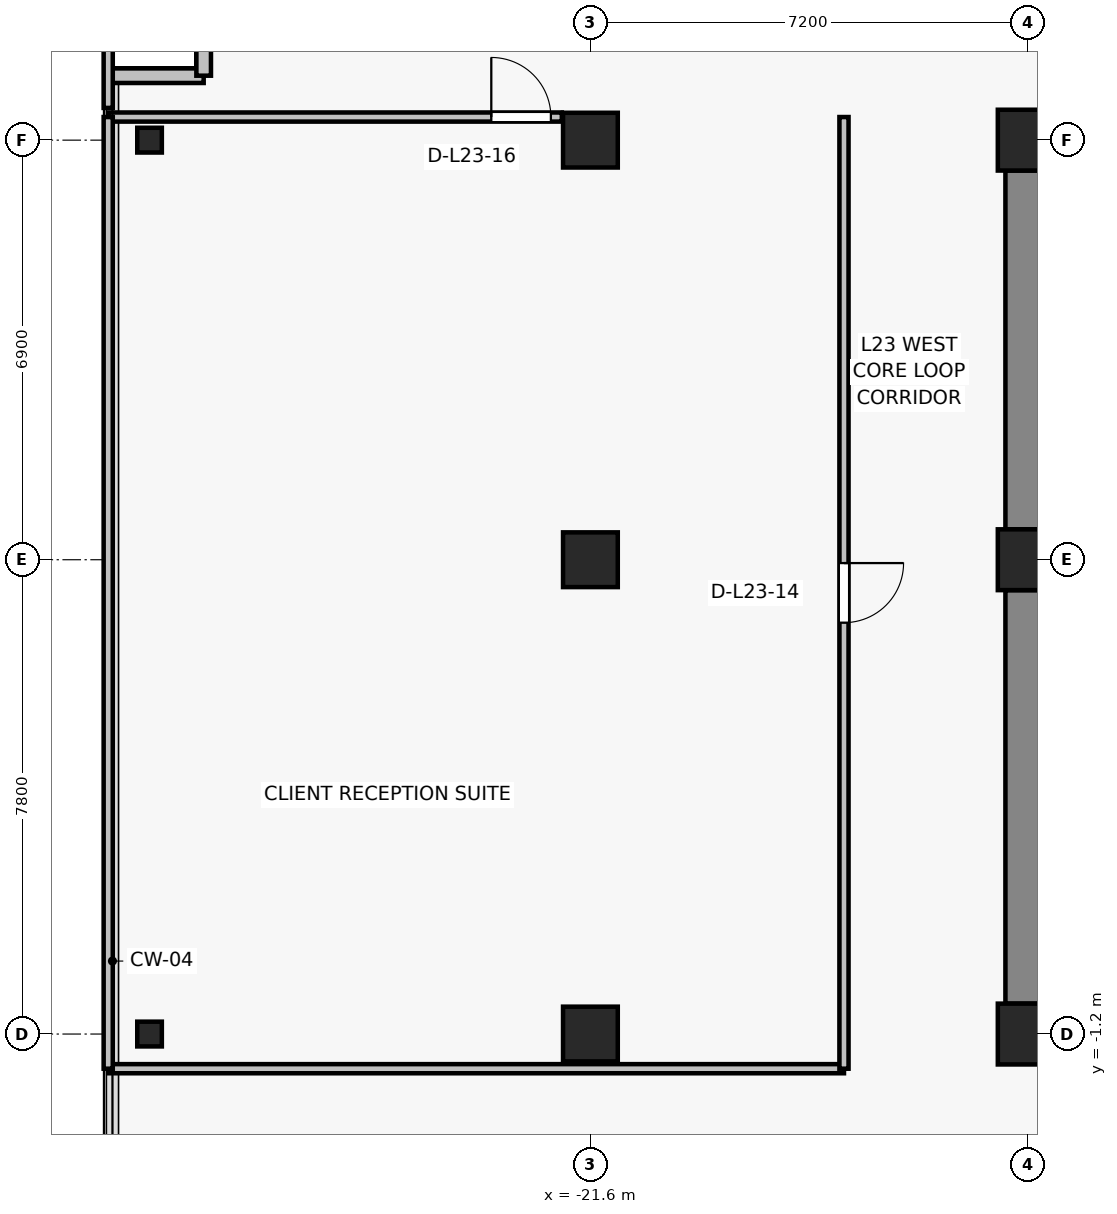
"""IFC4 building model, lengths in metres.
Left out: names, types, materials, properties, quantities, classifications, styles, units other than length and angle.
Written with IfcOpenShell. Run it as: python <this file> out.ifc"""

import sys

from ifc_helpers import new_model, si_unit, direction, frame, frame_2d, origin, origin_2d, place, context, subcontext, project, spatial, rectangle, i_section, extrude, source, transform, mapped, element, fill, save


model = new_model("IFC4")
c1 = context("Model", 3, precision=1e-05, world=origin(), true_north=direction((0.0, 1.0)))
c2 = subcontext(c1, "Body", "Model", "MODEL_VIEW")
j1 = project(units=[si_unit("LENGTHUNIT", "METRE"), si_unit("PLANEANGLEUNIT", "RADIAN")], contexts=[c1])
p1 = place(None, origin())
s1 = spatial("IfcSite", under=j1, at=p1, CompositionType="ELEMENT")
p2 = place(p1, origin())
s2 = spatial("IfcBuilding", under=s1, at=p2, CompositionType="ELEMENT")
p3 = place(p2, frame((0.0, 0.0, 86.8)))
s3 = spatial("IfcBuildingStorey", under=s2, at=p3, CompositionType="ELEMENT", Elevation=86.8)
for number, where, z_axis, x_axis in (
    (1, (-14.4, -1.2, 0.0), (0.0, 0.0, 1.0), (1.0, 0.0, 0.0)),
    (2, (-14.4, 6.6, 0.0), (0.0, 0.0, 1.0), (1.0, 0.0, 0.0)),
    (3, (-14.4, 13.5, 0.0), (0.0, 0.0, 1.0), (1.0, 0.0, 0.0)),
):
    element("IfcColumn", number, at=place(p3, frame(where, z_axis=z_axis, x_axis=x_axis)), inside=s3, PredefinedType="COLUMN", context=c2, shape_type="SweptSolid", body=[
        extrude(rectangle(XDim=1.0, YDim=1.0, at=origin_2d()), origin(), (0.0, 0.0, 1.0), 3.3),
    ])
for number, where, z_axis, x_axis in (
    (4, (-21.6, -1.2, 0.0), (0.0, 0.0, 1.0), (1.0, 0.0, 0.0)),
    (5, (-21.6, 6.6, 0.0), (0.0, 0.0, 1.0), (1.0, 0.0, 0.0)),
    (6, (-21.6, 13.5, 0.0), (0.0, 0.0, 1.0), (1.0, 0.0, 0.0)),
):
    element("IfcColumn", number, at=place(p3, frame(where, z_axis=z_axis, x_axis=x_axis)), inside=s3, PredefinedType="COLUMN", context=c2, shape_type="SweptSolid", body=[
        extrude(rectangle(XDim=0.9, YDim=0.9, at=origin_2d()), origin(), (0.0, 0.0, 1.0), 3.3),
    ])
for number, where, z_axis, x_axis in (
    (7, (-28.85, -1.2, 0.0), (0.0, 0.0, 1.0), (1.0, 0.0, 0.0)),
    (8, (-28.85, 13.5, 0.0), (0.0, 0.0, 1.0), (1.0, 0.0, 0.0)),
):
    element("IfcColumn", number, at=place(p3, frame(where, z_axis=z_axis, x_axis=x_axis)), inside=s3, PredefinedType="COLUMN", context=c2, shape_type="SweptSolid", body=[
        extrude(i_section(OverallWidth=0.404, OverallDepth=0.407, WebThickness=0.022, FlangeThickness=0.032, FilletRadius=0.015, at=origin_2d()), origin(), (0.0, 0.0, 1.0), 3.3),
    ])
p4 = place(p3, frame((-14.4, -0.7, 0.0), z_axis=(0.0, 0.0, 1.0), x_axis=(0.0, 1.0, 0.0)))
e9 = element("IfcWall", 9, at=p4, inside=s3, PredefinedType="SHEAR", context=c2, shape_type="SweptSolid", body=[
    extrude(rectangle(XDim=6.8, YDim=0.75, at=frame_2d((3.4, 0.0))), origin(), (0.0, 0.0, 1.0), 3.075),
])
p5 = place(p3, frame((-14.4, 7.1, 0.0), z_axis=(0.0, 0.0, 1.0), x_axis=(0.0, 1.0, 0.0)))
e10 = element("IfcWall", 10, at=p5, inside=s3, PredefinedType="SHEAR", context=c2, shape_type="SweptSolid", body=[
    extrude(rectangle(XDim=5.9, YDim=0.75, at=frame_2d((2.95, 0.0))), origin(), (0.0, 0.0, 1.0), 3.075),
])
for number, where, z_axis, x_axis in (
    (11, (-27.96, 14.56, 0.0), (0.0, 0.0, 1.0), (-1.0, 0.0, 0.0)),
    (12, (-27.96, 16.06, 0.0), (0.0, 0.0, 1.0), (0.0, -1.0, 0.0)),
):
    element("IfcWall", number, at=place(p3, frame(where, z_axis=z_axis, x_axis=x_axis)), inside=s3, PredefinedType="SOLIDWALL", context=c2, shape_type="SweptSolid", body=[
        extrude(rectangle(XDim=1.5, YDim=0.24, at=frame_2d((0.75, 0.0))), origin(), (0.0, 0.0, 1.0), 3.075),
    ])
p6 = place(p3, frame((-17.43, -1.77, 0.0), z_axis=(0.0, 0.0, 1.0), x_axis=(-1.0, 0.0, 0.0)))
e13 = element("IfcWall", 13, at=p6, inside=s3, PredefinedType="PARTITIONING", context=c2, shape_type="SweptSolid", body=[
    extrude(rectangle(XDim=12.1, YDim=0.15, at=frame_2d((6.05, 0.0))), origin(), (0.0, 0.0, 1.0), 2.515),
])
p7 = place(p3, frame((-29.53, 13.88, 0.0), z_axis=(0.0, 0.0, 1.0), x_axis=(1.0, 0.0, 0.0)))
e14 = element("IfcWall", 14, at=p7, inside=s3, PredefinedType="PARTITIONING", context=c2, shape_type="SweptSolid", body=[
    extrude(rectangle(XDim=7.46, YDim=0.15, at=frame_2d((3.73, 0.0))), origin(), (0.0, 0.0, 1.0), 3.075),
])
p8 = place(p7, frame((6.3, 0.0, 0.0)))
e15 = element("IfcOpeningElement", 15, at=p8, cuts=e14, PredefinedType="OPENING", context=c2, shape_type="SweptSolid", body=[
    extrude(rectangle(XDim=0.98, YDim=2.15, at=frame_2d((0.49, 1.075))), frame((0.0, 0.085, 0.0), z_axis=(0.0, -1.0, 0.0), x_axis=(1.0, 0.0, 0.0)), (0.0, 0.0, 1.0), 0.17),
])
p9 = place(p3, frame((-29.53, -1.77, 0.0), z_axis=(0.0, 0.0, 1.0), x_axis=(0.0, 1.0, 0.0)))
e16 = element("IfcWall", 16, at=p9, inside=s3, PredefinedType="PARTITIONING", context=c2, shape_type="SweptSolid", body=[
    extrude(rectangle(XDim=15.65, YDim=0.15, at=frame_2d((7.825, 0.0))), origin(), (0.0, 0.0, 1.0), 3.075),
])
p10 = place(p3, frame((-17.43, 13.88, 0.0), z_axis=(0.0, 0.0, 1.0), x_axis=(0.0, -1.0, 0.0)))
e17 = element("IfcWall", 17, at=p10, inside=s3, PredefinedType="PARTITIONING", context=c2, shape_type="SweptSolid", body=[
    extrude(rectangle(XDim=15.65, YDim=0.15, at=frame_2d((7.825, 0.0))), origin(), (0.0, 0.0, 1.0), 2.515),
])
p11 = place(p10, frame((7.335, 0.0, 0.0)))
e18 = element("IfcOpeningElement", 18, at=p11, cuts=e17, PredefinedType="OPENING", context=c2, shape_type="SweptSolid", body=[
    extrude(rectangle(XDim=0.98, YDim=2.15, at=frame_2d((0.49, 1.075))), frame((0.0, 0.085, 0.0), z_axis=(0.0, -1.0, 0.0), x_axis=(1.0, 0.0, 0.0)), (0.0, 0.0, 1.0), 0.17),
])
p12 = place(p3, frame((-29.53, 14.03, 0.0), z_axis=(0.0, 0.0, 1.0), x_axis=(0.0, 1.0, 0.0)))
e19 = element("IfcWall", 19, at=p12, inside=s3, PredefinedType="PARTITIONING", context=c2, shape_type="SweptSolid", body=[
    extrude(rectangle(XDim=3.6, YDim=0.15, at=frame_2d((1.8, 0.0))), origin(), (0.0, 0.0, 1.0), 3.075),
])
m1 = source(origin(), c2, "Body", "SweptSolid", [
    extrude(rectangle(XDim=0.98, YDim=2.15, at=frame_2d((0.49, 1.075))), frame((0.0, 0.025, 0.0), z_axis=(0.0, -1.0, 0.0), x_axis=(1.0, 0.0, 0.0)), (0.0, 0.0, 1.0), 0.05),
])
p13 = place(p11, origin())
e20 = element("IfcDoor", 20, at=p13, inside=s3, OperationType="SINGLE_SWING_LEFT", PredefinedType="DOOR", context=c2, shape_type="MappedRepresentation", body=[
    mapped(m1, transform((0.0, 0.0, 0.0), x_axis=(1.0, 0.0, 0.0), y_axis=(0.0, 1.0, 0.0), z_axis=(0.0, 0.0, 1.0), scale=1.0)),
])
fill(e18, e20)
p14 = place(p8, origin())
e21 = element("IfcDoor", 21, at=p14, inside=s3, OperationType="SINGLE_SWING_LEFT", PredefinedType="DOOR", context=c2, shape_type="MappedRepresentation", body=[
    mapped(m1, transform((0.0, 0.0, 0.0), x_axis=(1.0, 0.0, 0.0), y_axis=(0.0, 1.0, 0.0), z_axis=(0.0, 0.0, 1.0), scale=1.0)),
])
fill(e15, e21)
save(model, sys.argv[1])
